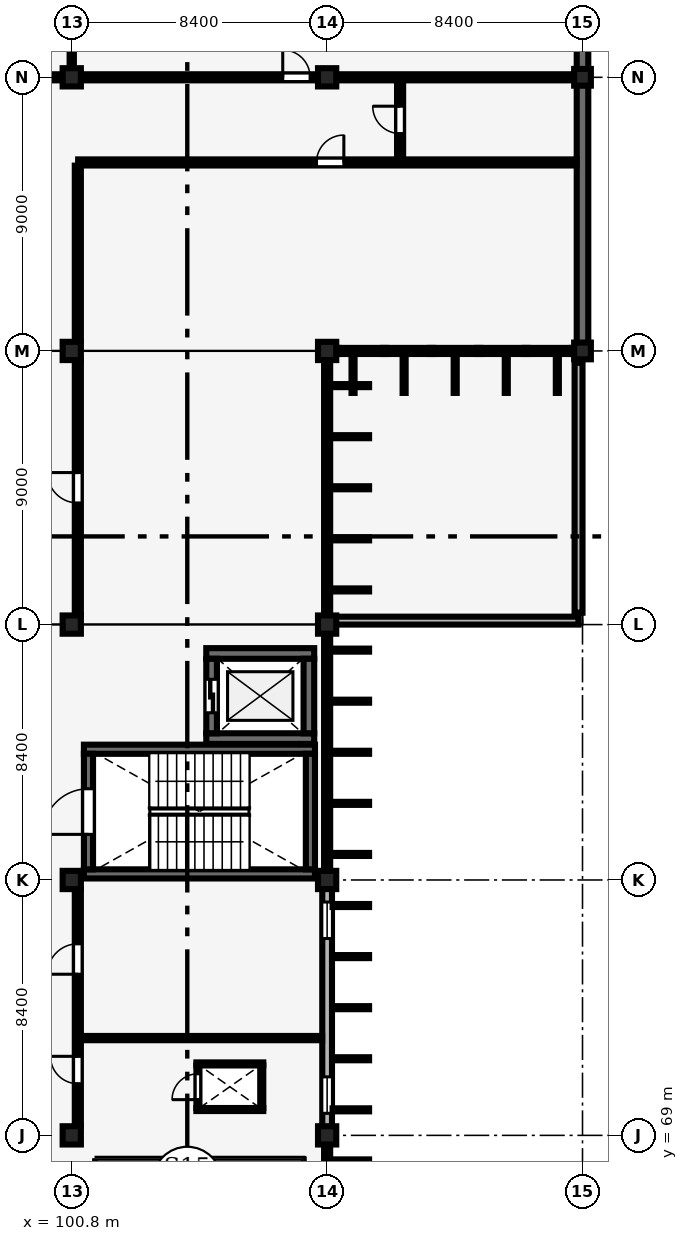
"""IFC4 building model, lengths in metres.
Left out: names, types, materials, properties, quantities, classifications, styles, units other than length and angle.
Written with IfcOpenShell. Run it as: python <this file> out.ifc"""

import sys

from ifc_helpers import new_model, si_unit, direction, frame, frame_2d, origin, origin_2d, place, context, subcontext, project, spatial, rectangle, extrude, element, fill, save


model = new_model("IFC4")
c1 = context("Model", 3, precision=1e-05, world=origin(), true_north=direction((0.0, 1.0)))
c2 = subcontext(c1, "Body", "Model", "MODEL_VIEW")
j1 = project(units=[si_unit("LENGTHUNIT", "METRE"), si_unit("PLANEANGLEUNIT", "RADIAN")], contexts=[c1])
p1 = place(None, origin())
s1 = spatial("IfcSite", under=j1, at=p1, CompositionType="ELEMENT")
p2 = place(p1, origin())
s2 = spatial("IfcBuilding", under=s1, at=p2, CompositionType="ELEMENT")
p3 = place(p2, frame((0.0, 0.0, 9.0)))
s3 = spatial("IfcBuildingStorey", under=s2, at=p3, CompositionType="ELEMENT", Elevation=9.0)
for number, where, z_axis, x_axis in (
    (1, (100.8, 69.0, 0.0), (0.0, 0.0, 1.0), (1.0, 0.0, 0.0)),
    (2, (100.8, 77.4, 0.0), (0.0, 0.0, 1.0), (1.0, 0.0, 0.0)),
    (3, (100.8, 85.8, 0.0), (0.0, 0.0, 1.0), (1.0, 0.0, 0.0)),
    (4, (100.8, 94.8, 0.0), (0.0, 0.0, 1.0), (1.0, 0.0, 0.0)),
    (5, (100.8, 103.8, 0.0), (0.0, 0.0, 1.0), (1.0, 0.0, 0.0)),
    (6, (109.2, 69.0, 0.0), (0.0, 0.0, 1.0), (1.0, 0.0, 0.0)),
    (7, (109.2, 77.4, 0.0), (0.0, 0.0, 1.0), (1.0, 0.0, 0.0)),
    (8, (109.2, 85.8, 0.0), (0.0, 0.0, 1.0), (1.0, 0.0, 0.0)),
    (9, (109.2, 94.8, 0.0), (0.0, 0.0, 1.0), (1.0, 0.0, 0.0)),
    (10, (109.2, 103.8, 0.0), (0.0, 0.0, 1.0), (1.0, 0.0, 0.0)),
):
    element("IfcColumn", number, at=place(p3, frame(where, z_axis=z_axis, x_axis=x_axis)), inside=s3, PredefinedType="COLUMN", context=c2, shape_type="SweptSolid", body=[
        extrude(rectangle(XDim=0.6, YDim=0.6, at=origin_2d()), origin(), (0.0, 0.0, 1.0), 4.2),
    ])
for number, where, z_axis, x_axis in (
    (11, (117.6, 94.8, 0.0), (0.0, 0.0, 1.0), (1.0, 0.0, 0.0)),
    (12, (117.6, 103.8, 0.0), (0.0, 0.0, 1.0), (1.0, 0.0, 0.0)),
):
    element("IfcColumn", number, at=place(p3, frame(where, z_axis=z_axis, x_axis=x_axis)), inside=s3, PredefinedType="COLUMN", context=c2, shape_type="SweptSolid", body=[
        extrude(rectangle(XDim=0.55, YDim=0.55, at=origin_2d()), origin(), (0.0, 0.0, 1.0), 4.2),
    ])
p4 = place(p3, frame((109.2, 69.275, 0.0), z_axis=(0.0, 0.0, 1.0), x_axis=(0.0, 1.0, 0.0)))
e13 = element("IfcWall", 13, at=p4, inside=s3, PredefinedType="SOLIDWALL", context=c2, shape_type="SweptSolid", body=[
    extrude(rectangle(XDim=7.85, YDim=0.32, at=frame_2d((3.925, 0.0))), origin(), (0.0, 0.0, 1.0), 3.29),
])
p5 = place(p4, frame((0.45, 0.0, 0.85)))
e14 = element("IfcOpeningElement", 14, at=p5, cuts=e13, PredefinedType="OPENING", context=c2, shape_type="SweptSolid", body=[
    extrude(rectangle(XDim=1.2, YDim=1.8, at=frame_2d((0.6, 0.9))), frame((0.0, 0.17, 0.0), z_axis=(0.0, -1.0, 0.0), x_axis=(1.0, 0.0, 0.0)), (0.0, 0.0, 1.0), 0.34),
])
p6 = place(p4, frame((6.2, 0.0, 0.85)))
e15 = element("IfcOpeningElement", 15, at=p6, cuts=e13, PredefinedType="OPENING", context=c2, shape_type="SweptSolid", body=[
    extrude(rectangle(XDim=1.2, YDim=1.8, at=frame_2d((0.6, 0.9))), frame((0.0, 0.17, 0.0), z_axis=(0.0, -1.0, 0.0), x_axis=(1.0, 0.0, 0.0)), (0.0, 0.0, 1.0), 0.34),
])
p7 = place(p3, frame((117.6, 95.05, 0.0), z_axis=(0.0, 0.0, 1.0), x_axis=(0.0, 1.0, 0.0)))
e16 = element("IfcWall", 16, at=p7, inside=s3, PredefinedType="SHEAR", context=c2, shape_type="SweptSolid", body=[
    extrude(rectangle(XDim=8.5, YDim=0.38, at=frame_2d((4.25, 0.0))), origin(), (0.0, 0.0, 1.0), 3.11),
])
p8 = place(p3, frame((117.6, 104.05, 0.0), z_axis=(0.0, 0.0, 1.0), x_axis=(0.0, 1.0, 0.0)))
e17 = element("IfcWall", 17, at=p8, inside=s3, PredefinedType="SHEAR", context=c2, shape_type="SweptSolid", body=[
    extrude(rectangle(XDim=8.5, YDim=0.38, at=frame_2d((4.25, 0.0))), origin(), (0.0, 0.0, 1.0), 3.06),
])
p9 = place(p3, frame((109.33, 85.93, 0.0), z_axis=(0.0, 0.0, 1.0), x_axis=(1.0, 0.0, 0.0)))
e18 = element("IfcWall", 18, at=p9, inside=s3, PredefinedType="PARAPET", context=c2, shape_type="SweptSolid", body=[
    extrude(rectangle(XDim=8.14, YDim=0.26, at=frame_2d((4.07, 0.0))), origin(), (0.0, 0.0, 1.0), 0.85),
])
p10 = place(p3, frame((117.47, 86.19, 0.0), z_axis=(0.0, 0.0, 1.0), x_axis=(0.0, 1.0, 0.0)))
e19 = element("IfcWall", 19, at=p10, inside=s3, PredefinedType="PARAPET", context=c2, shape_type="SweptSolid", body=[
    extrude(rectangle(XDim=8.22, YDim=0.26, at=frame_2d((4.11, 0.0))), origin(), (0.0, 0.0, 1.0), 0.85),
])
for number, where, z_axis, x_axis in (
    (20, (101.2, 77.6, 0.0), (0.0, 0.0, 1.0), (1.0, 0.0, 0.0)),
    (21, (101.2, 81.7, 0.0), (0.0, 0.0, 1.0), (1.0, 0.0, 0.0)),
):
    element("IfcWall", number, at=place(p3, frame(where, z_axis=z_axis, x_axis=x_axis)), inside=s3, PredefinedType="SHEAR", context=c2, shape_type="SweptSolid", body=[
        extrude(rectangle(XDim=7.6, YDim=0.3, at=frame_2d((3.8, 0.0))), origin(), (0.0, 0.0, 1.0), 4.025),
    ])
p11 = place(p3, frame((101.35, 77.75, 0.0), z_axis=(0.0, 0.0, 1.0), x_axis=(0.0, 1.0, 0.0)))
e22 = element("IfcWall", 22, at=p11, inside=s3, PredefinedType="SHEAR", context=c2, shape_type="SweptSolid", body=[
    extrude(rectangle(XDim=3.8, YDim=0.3, at=frame_2d((1.9, 0.0))), origin(), (0.0, 0.0, 1.0), 4.025),
])
p12 = place(p11, frame((1.15, 0.0, 0.0)))
e23 = element("IfcOpeningElement", 23, at=p12, cuts=e22, PredefinedType="OPENING", context=c2, shape_type="SweptSolid", body=[
    extrude(rectangle(XDim=1.5, YDim=2.2, at=frame_2d((0.75, 1.1))), frame((0.0, 0.16, 0.0), z_axis=(0.0, -1.0, 0.0), x_axis=(1.0, 0.0, 0.0)), (0.0, 0.0, 1.0), 0.32),
])
p13 = place(p3, frame((108.65, 77.75, 0.0), z_axis=(0.0, 0.0, 1.0), x_axis=(0.0, 1.0, 0.0)))
e24 = element("IfcWall", 24, at=p13, inside=s3, PredefinedType="SHEAR", context=c2, shape_type="SweptSolid", body=[
    extrude(rectangle(XDim=3.8, YDim=0.3, at=frame_2d((1.9, 0.0))), origin(), (0.0, 0.0, 1.0), 4.025),
])
for number, where, z_axis, x_axis in (
    (25, (105.225, 82.05, 0.0), (0.0, 0.0, 1.0), (1.0, 0.0, 0.0)),
    (26, (105.225, 84.85, 0.0), (0.0, 0.0, 1.0), (1.0, 0.0, 0.0)),
):
    element("IfcWall", number, at=place(p3, frame(where, z_axis=z_axis, x_axis=x_axis)), inside=s3, PredefinedType="SHEAR", context=c2, shape_type="SweptSolid", body=[
        extrude(rectangle(XDim=3.55, YDim=0.35, at=frame_2d((1.775, 0.0))), origin(), (0.0, 0.0, 1.0), 3.92),
    ])
p14 = place(p3, frame((105.4, 82.225, 0.0), z_axis=(0.0, 0.0, 1.0), x_axis=(0.0, 1.0, 0.0)))
e27 = element("IfcWall", 27, at=p14, inside=s3, PredefinedType="SHEAR", context=c2, shape_type="SweptSolid", body=[
    extrude(rectangle(XDim=2.45, YDim=0.35, at=frame_2d((1.225, 0.0))), origin(), (0.0, 0.0, 1.0), 3.92),
])
p15 = place(p14, frame((0.675, 0.0, 0.0)))
e28 = element("IfcOpeningElement", 28, at=p15, cuts=e27, PredefinedType="OPENING", context=c2, shape_type="SweptSolid", body=[
    extrude(rectangle(XDim=1.1, YDim=2.2, at=frame_2d((0.55, 1.1))), frame((0.0, 0.185, 0.0), z_axis=(0.0, -1.0, 0.0), x_axis=(1.0, 0.0, 0.0)), (0.0, 0.0, 1.0), 0.37),
])
p16 = place(p3, frame((108.6, 82.225, 0.0), z_axis=(0.0, 0.0, 1.0), x_axis=(0.0, 1.0, 0.0)))
e29 = element("IfcWall", 29, at=p16, inside=s3, PredefinedType="SHEAR", context=c2, shape_type="SweptSolid", body=[
    extrude(rectangle(XDim=2.45, YDim=0.35, at=frame_2d((1.225, 0.0))), origin(), (0.0, 0.0, 1.0), 3.92),
])
for number, where, z_axis, x_axis in (
    (30, (104.9, 69.85, 0.0), (0.0, 0.0, 1.0), (1.0, 0.0, 0.0)),
    (31, (104.9, 71.35, 0.0), (0.0, 0.0, 1.0), (1.0, 0.0, 0.0)),
):
    element("IfcWall", number, at=place(p3, frame(where, z_axis=z_axis, x_axis=x_axis)), inside=s3, PredefinedType="PARTITIONING", context=c2, shape_type="SweptSolid", body=[
        extrude(rectangle(XDim=2.2, YDim=0.1, at=frame_2d((1.1, 0.0))), origin(), (0.0, 0.0, 1.0), 3.9),
    ])
p17 = place(p3, frame((104.95, 69.9, 0.0), z_axis=(0.0, 0.0, 1.0), x_axis=(0.0, 1.0, 0.0)))
e32 = element("IfcWall", 32, at=p17, inside=s3, PredefinedType="PARTITIONING", context=c2, shape_type="SweptSolid", body=[
    extrude(rectangle(XDim=1.4, YDim=0.1, at=frame_2d((0.7, 0.0))), origin(), (0.0, 0.0, 1.0), 3.9),
])
p18 = place(p17, frame((0.275, 0.0, 0.0)))
e33 = element("IfcOpeningElement", 33, at=p18, cuts=e32, PredefinedType="OPENING", context=c2, shape_type="SweptSolid", body=[
    extrude(rectangle(XDim=0.85, YDim=2.05, at=frame_2d((0.425, 1.025))), frame((0.0, 0.06, 0.0), z_axis=(0.0, -1.0, 0.0), x_axis=(1.0, 0.0, 0.0)), (0.0, 0.0, 1.0), 0.12),
])
p19 = place(p3, frame((107.05, 69.9, 0.0), z_axis=(0.0, 0.0, 1.0), x_axis=(0.0, 1.0, 0.0)))
e34 = element("IfcWall", 34, at=p19, inside=s3, PredefinedType="PARTITIONING", context=c2, shape_type="SweptSolid", body=[
    extrude(rectangle(XDim=1.4, YDim=0.1, at=frame_2d((0.7, 0.0))), origin(), (0.0, 0.0, 1.0), 3.9),
])
p20 = place(p3, frame((111.6, 101.01, 0.0), z_axis=(0.0, 0.0, 1.0), x_axis=(0.0, 1.0, 0.0)))
e35 = element("IfcWall", 35, at=p20, inside=s3, PredefinedType="PARTITIONING", context=c2, shape_type="SweptSolid", body=[
    extrude(rectangle(XDim=2.78, YDim=0.2, at=frame_2d((1.39, 0.0))), origin(), (0.0, 0.0, 1.0), 3.9),
])
p21 = place(p20, frame((0.94, 0.0, 0.0)))
e36 = element("IfcOpeningElement", 36, at=p21, cuts=e35, PredefinedType="OPENING", context=c2, shape_type="SweptSolid", body=[
    extrude(rectangle(XDim=0.9, YDim=2.1, at=frame_2d((0.45, 1.05))), frame((0.0, 0.11, 0.0), z_axis=(0.0, -1.0, 0.0), x_axis=(1.0, 0.0, 0.0)), (0.0, 0.0, 1.0), 0.22),
])
p22 = place(p3, frame((100.8, 103.905, 0.0), z_axis=(0.0, 0.0, 1.0), x_axis=(0.0, 1.0, 0.0)))
e37 = element("IfcWall", 37, at=p22, inside=s3, PredefinedType="PARTITIONING", context=c2, shape_type="SweptSolid", body=[
    extrude(rectangle(XDim=8.73, YDim=0.14, at=frame_2d((4.365, 0.0))), origin(), (0.0, 0.0, 1.0), 2.96),
])
p23 = place(p3, frame((92.71, 103.8, 0.0), z_axis=(0.0, 0.0, 1.0), x_axis=(1.0, 0.0, 0.0)))
e38 = element("IfcWall", 38, at=p23, inside=s3, PredefinedType="PARTITIONING", context=c2, shape_type="SweptSolid", body=[
    extrude(rectangle(XDim=7.78, YDim=0.2, at=frame_2d((3.89, 0.0))), origin(), (0.0, 0.0, 1.0), 3.01),
])
p24 = place(p23, frame((0.25, 0.0, 0.0)))
e39 = element("IfcOpeningElement", 39, at=p24, cuts=e38, PredefinedType="OPENING", context=c2, shape_type="SweptSolid", body=[
    extrude(rectangle(XDim=0.9, YDim=2.1, at=frame_2d((0.45, 1.05))), frame((0.0, 0.11, 0.0), z_axis=(0.0, -1.0, 0.0), x_axis=(1.0, 0.0, 0.0)), (0.0, 0.0, 1.0), 0.22),
])
p25 = place(p3, frame((101.11, 103.8, 0.0), z_axis=(0.0, 0.0, 1.0), x_axis=(1.0, 0.0, 0.0)))
e40 = element("IfcWall", 40, at=p25, inside=s3, PredefinedType="PARTITIONING", context=c2, shape_type="SweptSolid", body=[
    extrude(rectangle(XDim=7.78, YDim=0.2, at=frame_2d((3.89, 0.0))), origin(), (0.0, 0.0, 1.0), 2.96),
])
p26 = place(p25, frame((6.63, 0.0, 0.0)))
e41 = element("IfcOpeningElement", 41, at=p26, cuts=e40, PredefinedType="OPENING", context=c2, shape_type="SweptSolid", body=[
    extrude(rectangle(XDim=0.9, YDim=2.1, at=frame_2d((0.45, 1.05))), frame((0.0, 0.11, 0.0), z_axis=(0.0, -1.0, 0.0), x_axis=(1.0, 0.0, 0.0)), (0.0, 0.0, 1.0), 0.22),
])
p27 = place(p3, frame((109.51, 103.8, 0.0), z_axis=(0.0, 0.0, 1.0), x_axis=(1.0, 0.0, 0.0)))
e42 = element("IfcWall", 42, at=p27, inside=s3, PredefinedType="PARTITIONING", context=c2, shape_type="SweptSolid", body=[
    extrude(rectangle(XDim=7.895, YDim=0.2, at=frame_2d((3.948, 0.0))), origin(), (0.0, 0.0, 1.0), 2.91),
])
p28 = place(p3, frame((101.01, 101.0, 0.0), z_axis=(0.0, 0.0, 1.0), x_axis=(1.0, 0.0, 0.0)))
e43 = element("IfcWall", 43, at=p28, inside=s3, PredefinedType="PARTITIONING", context=c2, shape_type="SweptSolid", body=[
    extrude(rectangle(XDim=16.395, YDim=0.2, at=frame_2d((8.198, 0.0))), origin(), (0.0, 0.0, 1.0), 3.48),
])
p29 = place(p28, frame((7.84, 0.0, 0.0)))
e44 = element("IfcOpeningElement", 44, at=p29, cuts=e43, PredefinedType="OPENING", context=c2, shape_type="SweptSolid", body=[
    extrude(rectangle(XDim=0.9, YDim=2.1, at=frame_2d((0.45, 1.05))), frame((0.0, 0.11, 0.0), z_axis=(0.0, -1.0, 0.0), x_axis=(1.0, 0.0, 0.0)), (0.0, 0.0, 1.0), 0.22),
])
p30 = place(p3, frame((101.0, 95.11, 0.0), z_axis=(0.0, 0.0, 1.0), x_axis=(0.0, 1.0, 0.0)))
e45 = element("IfcWall", 45, at=p30, inside=s3, PredefinedType="PARTITIONING", context=c2, shape_type="SweptSolid", body=[
    extrude(rectangle(XDim=5.785, YDim=0.2, at=frame_2d((2.893, 0.0))), origin(), (0.0, 0.0, 1.0), 3.01),
])
p31 = place(p3, frame((101.0, 86.11, 0.0), z_axis=(0.0, 0.0, 1.0), x_axis=(0.0, 1.0, 0.0)))
e46 = element("IfcWall", 46, at=p31, inside=s3, PredefinedType="PARTITIONING", context=c2, shape_type="SweptSolid", body=[
    extrude(rectangle(XDim=8.38, YDim=0.2, at=frame_2d((4.19, 0.0))), origin(), (0.0, 0.0, 1.0), 2.99),
])
p32 = place(p31, frame((3.69, 0.0, 0.0)))
e47 = element("IfcOpeningElement", 47, at=p32, cuts=e46, PredefinedType="OPENING", context=c2, shape_type="SweptSolid", body=[
    extrude(rectangle(XDim=1.0, YDim=2.15, at=frame_2d((0.5, 1.075))), frame((0.0, 0.11, 0.0), z_axis=(0.0, -1.0, 0.0), x_axis=(1.0, 0.0, 0.0)), (0.0, 0.0, 1.0), 0.22),
])
p33 = place(p3, frame((101.105, 72.2, 0.0), z_axis=(0.0, 0.0, 1.0), x_axis=(1.0, 0.0, 0.0)))
e48 = element("IfcWall", 48, at=p33, inside=s3, PredefinedType="PARTITIONING", context=c2, shape_type="SweptSolid", body=[
    extrude(rectangle(XDim=7.93, YDim=0.14, at=frame_2d((3.965, 0.0))), origin(), (0.0, 0.0, 1.0), 3.9),
])
p34 = place(p3, frame((101.0, 69.31, 0.0), z_axis=(0.0, 0.0, 1.0), x_axis=(0.0, 1.0, 0.0)))
e49 = element("IfcWall", 49, at=p34, inside=s3, PredefinedType="PARTITIONING", context=c2, shape_type="SweptSolid", body=[
    extrude(rectangle(XDim=7.78, YDim=0.2, at=frame_2d((3.89, 0.0))), origin(), (0.0, 0.0, 1.0), 3.09),
])
p35 = place(p34, frame((1.39, 0.0, 0.0)))
e50 = element("IfcOpeningElement", 50, at=p35, cuts=e49, PredefinedType="OPENING", context=c2, shape_type="SweptSolid", body=[
    extrude(rectangle(XDim=0.9, YDim=2.1, at=frame_2d((0.45, 1.05))), frame((0.0, 0.11, 0.0), z_axis=(0.0, -1.0, 0.0), x_axis=(1.0, 0.0, 0.0)), (0.0, 0.0, 1.0), 0.22),
])
p36 = place(p34, frame((4.99, 0.0, 0.0)))
e51 = element("IfcOpeningElement", 51, at=p36, cuts=e49, PredefinedType="OPENING", context=c2, shape_type="SweptSolid", body=[
    extrude(rectangle(XDim=1.0, YDim=2.15, at=frame_2d((0.5, 1.075))), frame((0.0, 0.11, 0.0), z_axis=(0.0, -1.0, 0.0), x_axis=(1.0, 0.0, 0.0)), (0.0, 0.0, 1.0), 0.22),
])
p37 = place(p5, origin())
e52 = element("IfcWindow", 52, at=p37, inside=s3, PartitioningType="SINGLE_PANEL", PredefinedType="WINDOW", context=c2, shape_type="SweptSolid", body=[
    extrude(rectangle(XDim=1.2, YDim=1.8, at=frame_2d((0.6, 0.9))), frame((0.0, 0.03, 0.0), z_axis=(0.0, -1.0, 0.0), x_axis=(1.0, 0.0, 0.0)), (0.0, 0.0, 1.0), 0.06),
])
fill(e14, e52)
p38 = place(p6, origin())
e53 = element("IfcWindow", 53, at=p38, inside=s3, PartitioningType="SINGLE_PANEL", PredefinedType="WINDOW", context=c2, shape_type="SweptSolid", body=[
    extrude(rectangle(XDim=1.2, YDim=1.8, at=frame_2d((0.6, 0.9))), frame((0.0, 0.03, 0.0), z_axis=(0.0, -1.0, 0.0), x_axis=(1.0, 0.0, 0.0)), (0.0, 0.0, 1.0), 0.06),
])
fill(e15, e53)
p39 = place(p12, origin())
e54 = element("IfcDoor", 54, at=p39, inside=s3, OperationType="DOUBLE_DOOR_SINGLE_SWING", PredefinedType="DOOR", context=c2, shape_type="SweptSolid", body=[
    extrude(rectangle(XDim=1.5, YDim=2.2, at=frame_2d((0.75, 1.1))), frame((0.0, 0.025, 0.0), z_axis=(0.0, -1.0, 0.0), x_axis=(1.0, 0.0, 0.0)), (0.0, 0.0, 1.0), 0.05),
])
fill(e23, e54)
p40 = place(p15, origin())
e55 = element("IfcDoor", 55, at=p40, inside=s3, OperationType="DOUBLE_DOOR_SLIDING", PredefinedType="DOOR", context=c2, shape_type="SweptSolid", body=[
    extrude(rectangle(XDim=1.1, YDim=2.2, at=frame_2d((0.55, 1.1))), frame((0.0, 0.025, 0.0), z_axis=(0.0, -1.0, 0.0), x_axis=(1.0, 0.0, 0.0)), (0.0, 0.0, 1.0), 0.05),
])
fill(e28, e55)
p41 = place(p18, origin())
e56 = element("IfcDoor", 56, at=p41, inside=s3, OperationType="SINGLE_SWING_LEFT", PredefinedType="DOOR", context=c2, shape_type="SweptSolid", body=[
    extrude(rectangle(XDim=0.85, YDim=2.05, at=frame_2d((0.425, 1.025))), frame((0.0, 0.025, 0.0), z_axis=(0.0, -1.0, 0.0), x_axis=(1.0, 0.0, 0.0)), (0.0, 0.0, 1.0), 0.05),
])
fill(e33, e56)
p42 = place(p21, origin())
e57 = element("IfcDoor", 57, at=p42, inside=s3, OperationType="SINGLE_SWING_RIGHT", PredefinedType="DOOR", context=c2, shape_type="SweptSolid", body=[
    extrude(rectangle(XDim=0.9, YDim=2.1, at=frame_2d((0.45, 1.05))), frame((0.0, 0.025, 0.0), z_axis=(0.0, -1.0, 0.0), x_axis=(1.0, 0.0, 0.0)), (0.0, 0.0, 1.0), 0.05),
])
fill(e36, e57)
p43 = place(p26, origin())
e58 = element("IfcDoor", 58, at=p43, inside=s3, OperationType="SINGLE_SWING_LEFT", PredefinedType="DOOR", context=c2, shape_type="SweptSolid", body=[
    extrude(rectangle(XDim=0.9, YDim=2.1, at=frame_2d((0.45, 1.05))), frame((0.0, 0.025, 0.0), z_axis=(0.0, -1.0, 0.0), x_axis=(1.0, 0.0, 0.0)), (0.0, 0.0, 1.0), 0.05),
])
fill(e41, e58)
p44 = place(p29, origin())
e59 = element("IfcDoor", 59, at=p44, inside=s3, OperationType="SINGLE_SWING_RIGHT", PredefinedType="DOOR", context=c2, shape_type="SweptSolid", body=[
    extrude(rectangle(XDim=0.9, YDim=2.1, at=frame_2d((0.45, 1.05))), frame((0.0, 0.025, 0.0), z_axis=(0.0, -1.0, 0.0), x_axis=(1.0, 0.0, 0.0)), (0.0, 0.0, 1.0), 0.05),
])
fill(e44, e59)
p45 = place(p32, origin())
e60 = element("IfcDoor", 60, at=p45, inside=s3, OperationType="SINGLE_SWING_RIGHT", PredefinedType="DOOR", context=c2, shape_type="SweptSolid", body=[
    extrude(rectangle(XDim=1.0, YDim=2.15, at=frame_2d((0.5, 1.075))), frame((0.0, 0.025, 0.0), z_axis=(0.0, -1.0, 0.0), x_axis=(1.0, 0.0, 0.0)), (0.0, 0.0, 1.0), 0.05),
])
fill(e47, e60)
p46 = place(p35, origin())
e61 = element("IfcDoor", 61, at=p46, inside=s3, OperationType="SINGLE_SWING_RIGHT", PredefinedType="DOOR", context=c2, shape_type="SweptSolid", body=[
    extrude(rectangle(XDim=0.9, YDim=2.1, at=frame_2d((0.45, 1.05))), frame((0.0, 0.025, 0.0), z_axis=(0.0, -1.0, 0.0), x_axis=(1.0, 0.0, 0.0)), (0.0, 0.0, 1.0), 0.05),
])
fill(e50, e61)
p47 = place(p36, origin())
e62 = element("IfcDoor", 62, at=p47, inside=s3, OperationType="SINGLE_SWING_LEFT", PredefinedType="DOOR", context=c2, shape_type="SweptSolid", body=[
    extrude(rectangle(XDim=1.0, YDim=2.15, at=frame_2d((0.5, 1.075))), frame((0.0, 0.025, 0.0), z_axis=(0.0, -1.0, 0.0), x_axis=(1.0, 0.0, 0.0)), (0.0, 0.0, 1.0), 0.05),
])
fill(e51, e62)
save(model, sys.argv[1])
